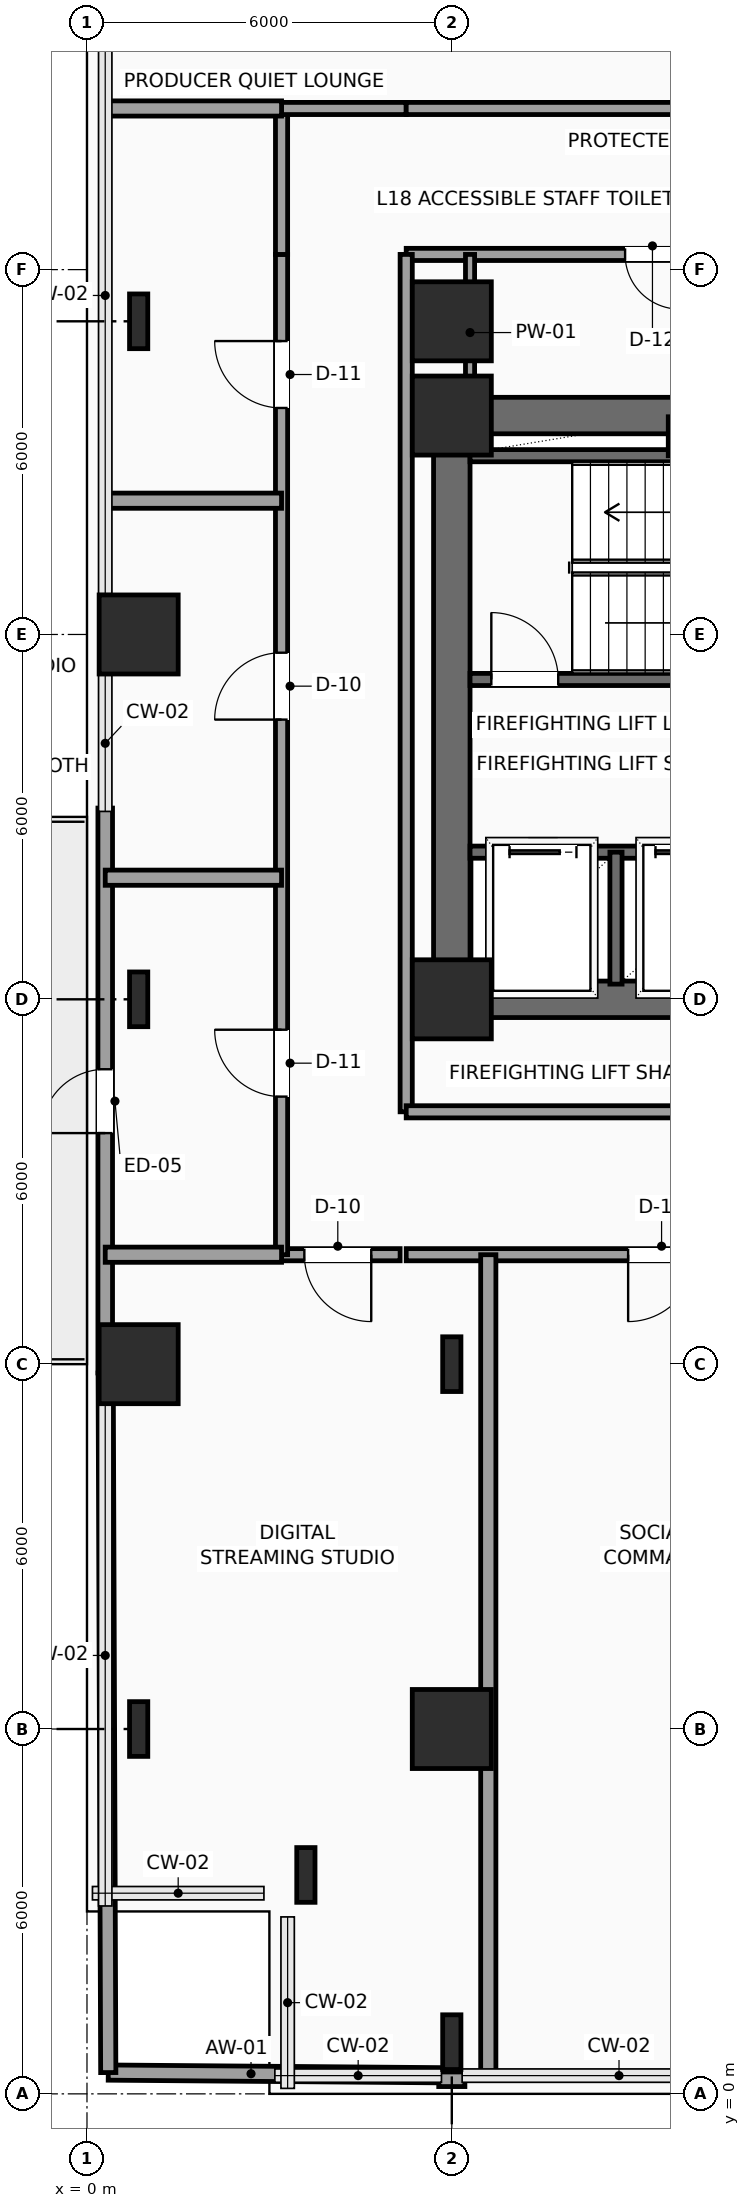
"""IFC4 building model, lengths in metres.
Left out: names, types, materials, properties, quantities, classifications, styles, units other than length and angle.
Written with IfcOpenShell. Run it as: python <this file> out.ifc"""

import sys

from ifc_helpers import new_model, si_unit, direction, frame, frame_2d, origin, origin_2d, place, context, subcontext, project, spatial, rectangle, i_section, extrude, element, fill, save


model = new_model("IFC4")
c1 = context("Model", 3, precision=1e-05, world=origin(), true_north=direction((0.0, 1.0)))
c2 = subcontext(c1, "Body", "Model", "MODEL_VIEW")
j1 = project(units=[si_unit("LENGTHUNIT", "METRE"), si_unit("PLANEANGLEUNIT", "RADIAN")], contexts=[c1])
p1 = place(None, origin())
s1 = spatial("IfcSite", under=j1, at=p1, CompositionType="ELEMENT")
p2 = place(p1, origin())
s2 = spatial("IfcBuilding", under=s1, at=p2, CompositionType="ELEMENT")
p3 = place(p2, frame((0.0, 0.0, 79.2)))
s3 = spatial("IfcBuildingStorey", under=s2, at=p3, CompositionType="ELEMENT", Elevation=79.2)
for number, where, z_axis, x_axis in (
    (1, (6.0, 18.0, 0.0), (0.0, 0.0, 1.0), (1.0, 0.0, 0.0)),
    (2, (6.0, 27.6, 0.0), (0.0, 0.0, 1.0), (1.0, 0.0, 0.0)),
):
    element("IfcColumn", number, at=place(p3, frame(where, z_axis=z_axis, x_axis=x_axis)), inside=s3, PredefinedType="COLUMN", context=c2, shape_type="SweptSolid", body=[
        extrude(rectangle(XDim=1.3, YDim=1.3, at=origin_2d()), origin(), (0.0, 0.0, 1.0), 3.9),
    ])
for number, where, z_axis, x_axis in (
    (3, (3.6, 3.6, 0.0), (0.0, 0.0, 1.0), (1.0, 0.0, 0.0)),
    (4, (0.85, 6.0, 0.0), (0.0, 0.0, 1.0), (1.0, 0.0, 0.0)),
):
    element("IfcColumn", number, at=place(p3, frame(where, z_axis=z_axis, x_axis=x_axis)), inside=s3, PredefinedType="COLUMN", context=c2, shape_type="SweptSolid", body=[
        extrude(i_section(OverallWidth=0.3, OverallDepth=0.9, WebThickness=0.019, FlangeThickness=0.035, FilletRadius=0.03, at=origin_2d()), origin(), (0.0, 0.0, 1.0), 3.9),
    ])
p4 = place(p3, frame((0.85, 12.0, 0.0), z_axis=(0.0, 0.0, 1.0), x_axis=(1.0, 0.0, 0.0)))
e5 = element("IfcColumn", 5, at=p4, inside=s3, PredefinedType="COLUMN", context=c2, shape_type="SweptSolid", body=[
    extrude(rectangle(XDim=1.3, YDim=1.3, at=origin_2d()), origin(), (0.0, 0.0, 1.0), 3.9),
])
p5 = place(p3, frame((0.85, 18.0, 0.0), z_axis=(0.0, 0.0, 1.0), x_axis=(1.0, 0.0, 0.0)))
e6 = element("IfcColumn", 6, at=p5, inside=s3, PredefinedType="COLUMN", context=c2, shape_type="SweptSolid", body=[
    extrude(i_section(OverallWidth=0.3, OverallDepth=0.9, WebThickness=0.019, FlangeThickness=0.035, FilletRadius=0.03, at=origin_2d()), origin(), (0.0, 0.0, 1.0), 3.9),
])
p6 = place(p3, frame((0.85, 24.0, 0.0), z_axis=(0.0, 0.0, 1.0), x_axis=(1.0, 0.0, 0.0)))
e7 = element("IfcColumn", 7, at=p6, inside=s3, PredefinedType="COLUMN", context=c2, shape_type="SweptSolid", body=[
    extrude(rectangle(XDim=1.3, YDim=1.3, at=origin_2d()), origin(), (0.0, 0.0, 1.0), 3.9),
])
for number, where, z_axis, x_axis in (
    (8, (0.85, 29.15, 0.0), (0.0, 0.0, 1.0), (1.0, 0.0, 0.0)),
    (9, (6.0, 0.85, 0.0), (0.0, 0.0, 1.0), (1.0, 0.0, 0.0)),
):
    element("IfcColumn", number, at=place(p3, frame(where, z_axis=z_axis, x_axis=x_axis)), inside=s3, PredefinedType="COLUMN", context=c2, shape_type="SweptSolid", body=[
        extrude(i_section(OverallWidth=0.3, OverallDepth=0.9, WebThickness=0.019, FlangeThickness=0.035, FilletRadius=0.03, at=origin_2d()), origin(), (0.0, 0.0, 1.0), 3.9),
    ])
p7 = place(p3, frame((6.0, 6.0, 0.0), z_axis=(0.0, 0.0, 1.0), x_axis=(1.0, 0.0, 0.0)))
e10 = element("IfcColumn", 10, at=p7, inside=s3, PredefinedType="COLUMN", context=c2, shape_type="SweptSolid", body=[
    extrude(rectangle(XDim=1.3, YDim=1.3, at=origin_2d()), origin(), (0.0, 0.0, 1.0), 3.9),
])
p8 = place(p3, frame((6.0, 12.0, 0.0), z_axis=(0.0, 0.0, 1.0), x_axis=(1.0, 0.0, 0.0)))
e11 = element("IfcColumn", 11, at=p8, inside=s3, PredefinedType="COLUMN", context=c2, shape_type="SweptSolid", body=[
    extrude(i_section(OverallWidth=0.3, OverallDepth=0.9, WebThickness=0.019, FlangeThickness=0.035, FilletRadius=0.03, at=origin_2d()), origin(), (0.0, 0.0, 1.0), 3.9),
])
p9 = place(p3, frame((6.0, 29.15, 0.0), z_axis=(0.0, 0.0, 1.0), x_axis=(1.0, 0.0, 0.0)))
e12 = element("IfcColumn", 12, at=p9, inside=s3, PredefinedType="COLUMN", context=c2, shape_type="SweptSolid", body=[
    extrude(rectangle(XDim=1.3, YDim=1.3, at=origin_2d()), origin(), (0.0, 0.0, 1.0), 3.9),
])
p10 = place(p3, frame((0.3, 11.855, 0.0), z_axis=(0.0, 0.0, 1.0), x_axis=(0.0, 1.0, 0.0)))
e13 = element("IfcWall", 13, at=p10, inside=s3, PredefinedType="SOLIDWALL", context=c2, shape_type="SweptSolid", body=[
    extrude(rectangle(XDim=9.29, YDim=0.24, at=frame_2d((4.645, 0.0))), origin(), (0.0, 0.0, 1.0), 3.65),
])
p11 = place(p10, frame((3.945, 0.0, 0.0)))
e14 = element("IfcOpeningElement", 14, at=p11, cuts=e13, PredefinedType="OPENING", context=c2, shape_type="SweptSolid", body=[
    extrude(rectangle(XDim=1.05, YDim=2.2, at=frame_2d((0.525, 1.1))), frame((0.0, 0.13, 0.0), z_axis=(0.0, -1.0, 0.0), x_axis=(1.0, 0.0, 0.0)), (0.0, 0.0, 1.0), 0.26),
])
p12 = place(p3, frame((6.215, 0.24, 0.0), z_axis=(0.0, 0.0, 1.0), x_axis=(-1.0, 0.0, 0.0)))
e15 = element("IfcWall", 15, at=p12, inside=s3, PredefinedType="SOLIDWALL", context=c2, shape_type="SweptSolid", body=[
    extrude(rectangle(XDim=0.43, YDim=0.24, at=frame_2d((0.215, 0.0))), origin(), (0.0, 0.0, 1.0), 3.65),
])
p13 = place(p3, frame((6.0, 18.0, 0.0), z_axis=(0.0, 0.0, 1.0), x_axis=(1.0, 0.0, 0.0)))
e16 = element("IfcWall", 16, at=p13, inside=s3, PredefinedType="SHEAR", context=c2, shape_type="SweptSolid", body=[
    extrude(rectangle(XDim=12.0, YDim=0.6, at=frame_2d((6.0, 0.0))), origin(), (0.0, 0.0, 1.0), 3.65),
])
p14 = place(p13, frame((7.15, 0.0, 0.0)))
e17 = element("IfcOpeningElement", 17, at=p14, cuts=e16, PredefinedType="OPENING", context=c2, shape_type="SweptSolid", body=[
    extrude(rectangle(XDim=1.6, YDim=2.3, at=frame_2d((0.8, 1.15))), frame((0.0, 0.31, 0.0), z_axis=(0.0, -1.0, 0.0), x_axis=(1.0, 0.0, 0.0)), (0.0, 0.0, 1.0), 0.62),
])
p15 = place(p3, frame((6.0, 27.6, 0.0), z_axis=(0.0, 0.0, 1.0), x_axis=(1.0, 0.0, 0.0)))
e18 = element("IfcWall", 18, at=p15, inside=s3, PredefinedType="SHEAR", context=c2, shape_type="SweptSolid", body=[
    extrude(rectangle(XDim=12.0, YDim=0.6, at=frame_2d((6.0, 0.0))), origin(), (0.0, 0.0, 1.0), 3.65),
])
p16 = place(p15, frame((10.2, 0.0, 0.0)))
e19 = element("IfcOpeningElement", 19, at=p16, cuts=e18, PredefinedType="OPENING", context=c2, shape_type="SweptSolid", body=[
    extrude(rectangle(XDim=0.9, YDim=2.15, at=frame_2d((0.45, 1.075))), frame((0.0, 0.31, 0.0), z_axis=(0.0, -1.0, 0.0), x_axis=(1.0, 0.0, 0.0)), (0.0, 0.0, 1.0), 0.62),
])
p17 = place(p3, frame((6.0, 18.0, 0.0), z_axis=(0.0, 0.0, 1.0), x_axis=(0.0, 1.0, 0.0)))
e20 = element("IfcWall", 20, at=p17, inside=s3, PredefinedType="SHEAR", context=c2, shape_type="SweptSolid", body=[
    extrude(rectangle(XDim=9.6, YDim=0.6, at=frame_2d((4.8, 0.0))), origin(), (0.0, 0.0, 1.0), 3.65),
])
p18 = place(p3, frame((6.3, 23.26, 0.0), z_axis=(0.0, 0.0, 1.0), x_axis=(1.0, 0.0, 0.0)))
e21 = element("IfcWall", 21, at=p18, inside=s3, PredefinedType="SHEAR", context=c2, shape_type="SweptSolid", body=[
    extrude(rectangle(XDim=8.88, YDim=0.2, at=frame_2d((4.44, 0.0))), origin(), (0.0, 0.0, 1.0), 3.65),
])
p19 = place(p18, frame((0.35, 0.0, 0.0)))
e22 = element("IfcOpeningElement", 22, at=p19, cuts=e21, PredefinedType="OPENING", context=c2, shape_type="SweptSolid", body=[
    extrude(rectangle(XDim=1.1, YDim=2.2, at=frame_2d((0.55, 1.1))), frame((0.0, 0.11, 0.0), z_axis=(0.0, -1.0, 0.0), x_axis=(1.0, 0.0, 0.0)), (0.0, 0.0, 1.0), 0.22),
])
p20 = place(p3, frame((6.3, 26.94, 0.0), z_axis=(0.0, 0.0, 1.0), x_axis=(1.0, 0.0, 0.0)))
e23 = element("IfcWall", 23, at=p20, inside=s3, PredefinedType="SHEAR", context=c2, shape_type="SweptSolid", body=[
    extrude(rectangle(XDim=8.88, YDim=0.2, at=frame_2d((4.44, 0.0))), origin(), (0.0, 0.0, 1.0), 3.65),
])
p21 = place(p3, frame((6.3, 20.42, 0.0), z_axis=(0.0, 0.0, 1.0), x_axis=(1.0, 0.0, 0.0)))
e24 = element("IfcWall", 24, at=p21, inside=s3, PredefinedType="SHEAR", context=c2, shape_type="SweptSolid", body=[
    extrude(rectangle(XDim=4.95, YDim=0.2, at=frame_2d((2.475, 0.0))), origin(), (0.0, 0.0, 1.0), 3.65),
])
p22 = place(p21, frame((0.65, 0.0, 0.0)))
e25 = element("IfcOpeningElement", 25, at=p22, cuts=e24, PredefinedType="OPENING", context=c2, shape_type="SweptSolid", body=[
    extrude(rectangle(XDim=1.1, YDim=2.2, at=frame_2d((0.55, 1.1))), frame((0.0, 0.11, 0.0), z_axis=(0.0, -1.0, 0.0), x_axis=(1.0, 0.0, 0.0)), (0.0, 0.0, 1.0), 0.22),
])
p23 = place(p21, frame((3.05, 0.0, 0.0)))
e26 = element("IfcOpeningElement", 26, at=p23, cuts=e24, PredefinedType="OPENING", context=c2, shape_type="SweptSolid", body=[
    extrude(rectangle(XDim=1.1, YDim=2.2, at=frame_2d((0.55, 1.1))), frame((0.0, 0.11, 0.0), z_axis=(0.0, -1.0, 0.0), x_axis=(1.0, 0.0, 0.0)), (0.0, 0.0, 1.0), 0.22),
])
p24 = place(p3, frame((8.7, 18.25, 0.0), z_axis=(0.0, 0.0, 1.0), x_axis=(0.0, 1.0, 0.0)))
e27 = element("IfcWall", 27, at=p24, inside=s3, PredefinedType="SHEAR", context=c2, shape_type="SweptSolid", body=[
    extrude(rectangle(XDim=2.17, YDim=0.2, at=frame_2d((1.085, 0.0))), origin(), (0.0, 0.0, 1.0), 3.65),
])
p25 = place(p3, frame((9.66, 26.94, 0.0), z_axis=(0.0, 0.0, 1.0), x_axis=(0.0, 1.0, 0.0)))
e28 = element("IfcWall", 28, at=p25, inside=s3, PredefinedType="SOLIDWALL", context=c2, shape_type="SweptSolid", body=[
    extrude(rectangle(XDim=0.64, YDim=0.2, at=frame_2d((0.32, 0.0))), origin(), (0.0, 0.0, 1.0), 3.65),
])
p26 = place(p3, frame((12.4, 13.8, 0.0), z_axis=(0.0, 0.0, 1.0), x_axis=(-1.0, 0.0, 0.0)))
e29 = element("IfcWall", 29, at=p26, inside=s3, PredefinedType="PARTITIONING", context=c2, shape_type="SweptSolid", body=[
    extrude(rectangle(XDim=7.15, YDim=0.2, at=frame_2d((3.575, 0.0))), origin(), (0.0, 0.0, 1.0), 3.65),
])
p27 = place(p26, frame((2.4, 0.0, 0.0)))
e30 = element("IfcOpeningElement", 30, at=p27, cuts=e29, PredefinedType="OPENING", context=c2, shape_type="SweptSolid", body=[
    extrude(rectangle(XDim=1.1, YDim=2.25, at=frame_2d((0.55, 1.125))), frame((0.0, 0.11, 0.0), z_axis=(0.0, -1.0, 0.0), x_axis=(1.0, 0.0, 0.0)), (0.0, 0.0, 1.0), 0.22),
])
p28 = place(p3, frame((5.15, 13.8, 0.0), z_axis=(0.0, 0.0, 1.0), x_axis=(-1.0, 0.0, 0.0)))
e31 = element("IfcWall", 31, at=p28, inside=s3, PredefinedType="PARTITIONING", context=c2, shape_type="SweptSolid", body=[
    extrude(rectangle(XDim=1.95, YDim=0.2, at=frame_2d((0.975, 0.0))), origin(), (0.0, 0.0, 1.0), 3.65),
])
p29 = place(p28, frame((0.475, 0.0, 0.0)))
e32 = element("IfcOpeningElement", 32, at=p29, cuts=e31, PredefinedType="OPENING", context=c2, shape_type="SweptSolid", body=[
    extrude(rectangle(XDim=1.1, YDim=2.25, at=frame_2d((0.55, 1.125))), frame((0.0, 0.11, 0.0), z_axis=(0.0, -1.0, 0.0), x_axis=(1.0, 0.0, 0.0)), (0.0, 0.0, 1.0), 0.22),
])
p30 = place(p3, frame((3.2, 13.8, 0.0), z_axis=(0.0, 0.0, 1.0), x_axis=(0.0, 1.0, 0.0)))
e33 = element("IfcWall", 33, at=p30, inside=s3, PredefinedType="PARTITIONING", context=c2, shape_type="SweptSolid", body=[
    extrude(rectangle(XDim=16.45, YDim=0.2, at=frame_2d((8.225, 0.0))), origin(), (0.0, 0.0, 1.0), 3.65),
])
p31 = place(p30, frame((2.6, 0.0, 0.0)))
e34 = element("IfcOpeningElement", 34, at=p31, cuts=e33, PredefinedType="OPENING", context=c2, shape_type="SweptSolid", body=[
    extrude(rectangle(XDim=1.1, YDim=2.25, at=frame_2d((0.55, 1.125))), frame((0.0, 0.11, 0.0), z_axis=(0.0, -1.0, 0.0), x_axis=(1.0, 0.0, 0.0)), (0.0, 0.0, 1.0), 0.22),
])
p32 = place(p30, frame((8.8, 0.0, 0.0)))
e35 = element("IfcOpeningElement", 35, at=p32, cuts=e33, PredefinedType="OPENING", context=c2, shape_type="SweptSolid", body=[
    extrude(rectangle(XDim=1.1, YDim=2.25, at=frame_2d((0.55, 1.125))), frame((0.0, 0.11, 0.0), z_axis=(0.0, -1.0, 0.0), x_axis=(1.0, 0.0, 0.0)), (0.0, 0.0, 1.0), 0.22),
])
p33 = place(p30, frame((13.925, 0.0, 0.0)))
e36 = element("IfcOpeningElement", 36, at=p33, cuts=e33, PredefinedType="OPENING", context=c2, shape_type="SweptSolid", body=[
    extrude(rectangle(XDim=1.1, YDim=2.25, at=frame_2d((0.55, 1.125))), frame((0.0, 0.11, 0.0), z_axis=(0.0, -1.0, 0.0), x_axis=(1.0, 0.0, 0.0)), (0.0, 0.0, 1.0), 0.22),
])
p34 = place(p3, frame((3.2, 30.25, 0.0), z_axis=(0.0, 0.0, 1.0), x_axis=(0.0, 1.0, 0.0)))
e37 = element("IfcWall", 37, at=p34, inside=s3, PredefinedType="PARTITIONING", context=c2, shape_type="SweptSolid", body=[
    extrude(rectangle(XDim=2.4, YDim=0.2, at=frame_2d((1.2, 0.0))), origin(), (0.0, 0.0, 1.0), 3.65),
])
p35 = place(p3, frame((3.2, 32.65, 0.0), z_axis=(0.0, 0.0, 1.0), x_axis=(1.0, 0.0, 0.0)))
e38 = element("IfcWall", 38, at=p35, inside=s3, PredefinedType="PARTITIONING", context=c2, shape_type="SweptSolid", body=[
    extrude(rectangle(XDim=2.05, YDim=0.2, at=frame_2d((1.025, 0.0))), origin(), (0.0, 0.0, 1.0), 3.65),
])
p36 = place(p3, frame((5.25, 32.65, 0.0), z_axis=(0.0, 0.0, 1.0), x_axis=(1.0, 0.0, 0.0)))
e39 = element("IfcWall", 39, at=p36, inside=s3, PredefinedType="PARTITIONING", context=c2, shape_type="SweptSolid", body=[
    extrude(rectangle(XDim=7.35, YDim=0.2, at=frame_2d((3.675, 0.0))), origin(), (0.0, 0.0, 1.0), 3.65),
])
p37 = place(p3, frame((15.88, 30.25, 0.0), z_axis=(0.0, 0.0, 1.0), x_axis=(-1.0, 0.0, 0.0)))
e40 = element("IfcWall", 40, at=p37, inside=s3, PredefinedType="PARTITIONING", context=c2, shape_type="SweptSolid", body=[
    extrude(rectangle(XDim=10.63, YDim=0.2, at=frame_2d((5.315, 0.0))), origin(), (0.0, 0.0, 1.0), 3.65),
])
p38 = place(p37, frame((6.13, 0.0, 0.0)))
e41 = element("IfcOpeningElement", 41, at=p38, cuts=e40, PredefinedType="OPENING", context=c2, shape_type="SweptSolid", body=[
    extrude(rectangle(XDim=0.9, YDim=2.1, at=frame_2d((0.45, 1.05))), frame((0.0, 0.11, 0.0), z_axis=(0.0, -1.0, 0.0), x_axis=(1.0, 0.0, 0.0)), (0.0, 0.0, 1.0), 0.22),
])
p39 = place(p3, frame((5.25, 30.25, 0.0), z_axis=(0.0, 0.0, 1.0), x_axis=(0.0, -1.0, 0.0)))
e42 = element("IfcWall", 42, at=p39, inside=s3, PredefinedType="PARTITIONING", context=c2, shape_type="SweptSolid", body=[
    extrude(rectangle(XDim=14.1, YDim=0.2, at=frame_2d((7.05, 0.0))), origin(), (0.0, 0.0, 1.0), 3.65),
])
p40 = place(p3, frame((5.25, 16.15, 0.0), z_axis=(0.0, 0.0, 1.0), x_axis=(1.0, 0.0, 0.0)))
e43 = element("IfcWall", 43, at=p40, inside=s3, PredefinedType="PARTITIONING", context=c2, shape_type="SweptSolid", body=[
    extrude(rectangle(XDim=7.15, YDim=0.2, at=frame_2d((3.575, 0.0))), origin(), (0.0, 0.0, 1.0), 3.65),
])
p41 = place(p3, frame((6.3, 27.68, 0.0), z_axis=(0.0, 0.0, 1.0), x_axis=(0.0, 1.0, 0.0)))
e44 = element("IfcWall", 44, at=p41, inside=s3, PredefinedType="PARTITIONING", context=c2, shape_type="SweptSolid", body=[
    extrude(rectangle(XDim=2.57, YDim=0.15, at=frame_2d((1.285, 0.0))), origin(), (0.0, 0.0, 1.0), 2.992),
])
p42 = place(p3, frame((0.35, 0.35, 0.0), z_axis=(0.0, 0.0, 1.0), x_axis=(0.99996767298, -0.008040708569, 0.0)))
e45 = element("IfcWall", 45, at=p42, inside=s3, PredefinedType="PARTITIONING", context=c2, shape_type="SweptSolid", body=[
    extrude(rectangle(XDim=5.435, YDim=0.25, at=frame_2d((2.718, 0.0))), origin(), (0.0, 0.0, 1.0), 3.65),
])
p43 = place(p3, frame((0.35, 0.35, 0.0), z_axis=(0.0, 0.0, 1.0), x_axis=(-0.003734801216, 0.999993025606, 0.0)))
e46 = element("IfcWall", 46, at=p43, inside=s3, PredefinedType="PARTITIONING", context=c2, shape_type="SweptSolid", body=[
    extrude(rectangle(XDim=11.505, YDim=0.25, at=frame_2d((5.752, 0.0))), origin(), (0.0, 0.0, 1.0), 3.65),
])
p44 = place(p3, frame((6.6, 0.3, 0.0), z_axis=(0.0, 0.0, 1.0), x_axis=(0.0, 1.0, 0.0)))
e47 = element("IfcWall", 47, at=p44, inside=s3, PredefinedType="PARTITIONING", context=c2, shape_type="SweptSolid", body=[
    extrude(rectangle(XDim=13.5, YDim=0.25, at=frame_2d((6.75, 0.0))), origin(), (0.0, 0.0, 1.0), 3.65),
])
for number, where, z_axis, x_axis in (
    (48, (0.3, 13.8, 0.0), (0.0, 0.0, 1.0), (1.0, 0.0, 0.0)),
    (49, (0.3, 20.0, 0.0), (0.0, 0.0, 1.0), (1.0, 0.0, 0.0)),
    (50, (0.3, 26.2, 0.0), (0.0, 0.0, 1.0), (1.0, 0.0, 0.0)),
    (51, (0.3, 32.65, 0.0), (0.0, 0.0, 1.0), (1.0, 0.0, 0.0)),
):
    element("IfcWall", number, at=place(p3, frame(where, z_axis=z_axis, x_axis=x_axis)), inside=s3, PredefinedType="PARTITIONING", context=c2, shape_type="SweptSolid", body=[
        extrude(rectangle(XDim=2.9, YDim=0.25, at=frame_2d((1.45, 0.0))), origin(), (0.0, 0.0, 1.0), 3.65),
    ])
p45 = place(p11, origin())
e52 = element("IfcDoor", 52, at=p45, inside=s3, OperationType="SINGLE_SWING_LEFT", PredefinedType="DOOR", context=c2, shape_type="SweptSolid", body=[
    extrude(rectangle(XDim=1.05, YDim=2.2, at=frame_2d((0.525, 1.1))), frame((0.0, 0.025, 0.0), z_axis=(0.0, -1.0, 0.0), x_axis=(1.0, 0.0, 0.0)), (0.0, 0.0, 1.0), 0.05),
])
fill(e14, e52)
p46 = place(p19, origin())
e53 = element("IfcDoor", 53, at=p46, inside=s3, OperationType="SINGLE_SWING_LEFT", PredefinedType="DOOR", context=c2, shape_type="SweptSolid", body=[
    extrude(rectangle(XDim=1.1, YDim=2.2, at=frame_2d((0.55, 1.1))), frame((0.0, 0.025, 0.0), z_axis=(0.0, -1.0, 0.0), x_axis=(1.0, 0.0, 0.0)), (0.0, 0.0, 1.0), 0.05),
])
fill(e22, e53)
p47 = place(p22, origin())
e54 = element("IfcDoor", 54, at=p47, inside=s3, OperationType="SLIDING_TO_LEFT", PredefinedType="DOOR", context=c2, shape_type="SweptSolid", body=[
    extrude(rectangle(XDim=1.1, YDim=2.2, at=frame_2d((0.55, 1.1))), frame((0.0, 0.025, 0.0), z_axis=(0.0, -1.0, 0.0), x_axis=(1.0, 0.0, 0.0)), (0.0, 0.0, 1.0), 0.05),
])
fill(e25, e54)
p48 = place(p23, origin())
e55 = element("IfcDoor", 55, at=p48, inside=s3, OperationType="SLIDING_TO_LEFT", PredefinedType="DOOR", context=c2, shape_type="SweptSolid", body=[
    extrude(rectangle(XDim=1.1, YDim=2.2, at=frame_2d((0.55, 1.1))), frame((0.0, 0.025, 0.0), z_axis=(0.0, -1.0, 0.0), x_axis=(1.0, 0.0, 0.0)), (0.0, 0.0, 1.0), 0.05),
])
fill(e26, e55)
p49 = place(p27, origin())
e56 = element("IfcDoor", 56, at=p49, inside=s3, OperationType="SINGLE_SWING_RIGHT", PredefinedType="DOOR", context=c2, shape_type="SweptSolid", body=[
    extrude(rectangle(XDim=1.1, YDim=2.25, at=frame_2d((0.55, 1.125))), frame((0.0, 0.025, 0.0), z_axis=(0.0, -1.0, 0.0), x_axis=(1.0, 0.0, 0.0)), (0.0, 0.0, 1.0), 0.05),
])
fill(e30, e56)
p50 = place(p29, origin())
e57 = element("IfcDoor", 57, at=p50, inside=s3, OperationType="SINGLE_SWING_LEFT", PredefinedType="DOOR", context=c2, shape_type="SweptSolid", body=[
    extrude(rectangle(XDim=1.1, YDim=2.25, at=frame_2d((0.55, 1.125))), frame((0.0, 0.025, 0.0), z_axis=(0.0, -1.0, 0.0), x_axis=(1.0, 0.0, 0.0)), (0.0, 0.0, 1.0), 0.05),
])
fill(e32, e57)
p51 = place(p31, origin())
e58 = element("IfcDoor", 58, at=p51, inside=s3, OperationType="SINGLE_SWING_RIGHT", PredefinedType="DOOR", context=c2, shape_type="SweptSolid", body=[
    extrude(rectangle(XDim=1.1, YDim=2.25, at=frame_2d((0.55, 1.125))), frame((0.0, 0.025, 0.0), z_axis=(0.0, -1.0, 0.0), x_axis=(1.0, 0.0, 0.0)), (0.0, 0.0, 1.0), 0.05),
])
fill(e34, e58)
p52 = place(p32, origin())
e59 = element("IfcDoor", 59, at=p52, inside=s3, OperationType="SINGLE_SWING_LEFT", PredefinedType="DOOR", context=c2, shape_type="SweptSolid", body=[
    extrude(rectangle(XDim=1.1, YDim=2.25, at=frame_2d((0.55, 1.125))), frame((0.0, 0.025, 0.0), z_axis=(0.0, -1.0, 0.0), x_axis=(1.0, 0.0, 0.0)), (0.0, 0.0, 1.0), 0.05),
])
fill(e35, e59)
p53 = place(p33, origin())
e60 = element("IfcDoor", 60, at=p53, inside=s3, OperationType="SINGLE_SWING_RIGHT", PredefinedType="DOOR", context=c2, shape_type="SweptSolid", body=[
    extrude(rectangle(XDim=1.1, YDim=2.25, at=frame_2d((0.55, 1.125))), frame((0.0, 0.025, 0.0), z_axis=(0.0, -1.0, 0.0), x_axis=(1.0, 0.0, 0.0)), (0.0, 0.0, 1.0), 0.05),
])
fill(e36, e60)
p54 = place(p38, origin())
e61 = element("IfcDoor", 61, at=p54, inside=s3, OperationType="SINGLE_SWING_LEFT", PredefinedType="DOOR", context=c2, shape_type="SweptSolid", body=[
    extrude(rectangle(XDim=0.9, YDim=2.1, at=frame_2d((0.45, 1.05))), frame((0.0, 0.025, 0.0), z_axis=(0.0, -1.0, 0.0), x_axis=(1.0, 0.0, 0.0)), (0.0, 0.0, 1.0), 0.05),
])
fill(e41, e61)
save(model, sys.argv[1])
